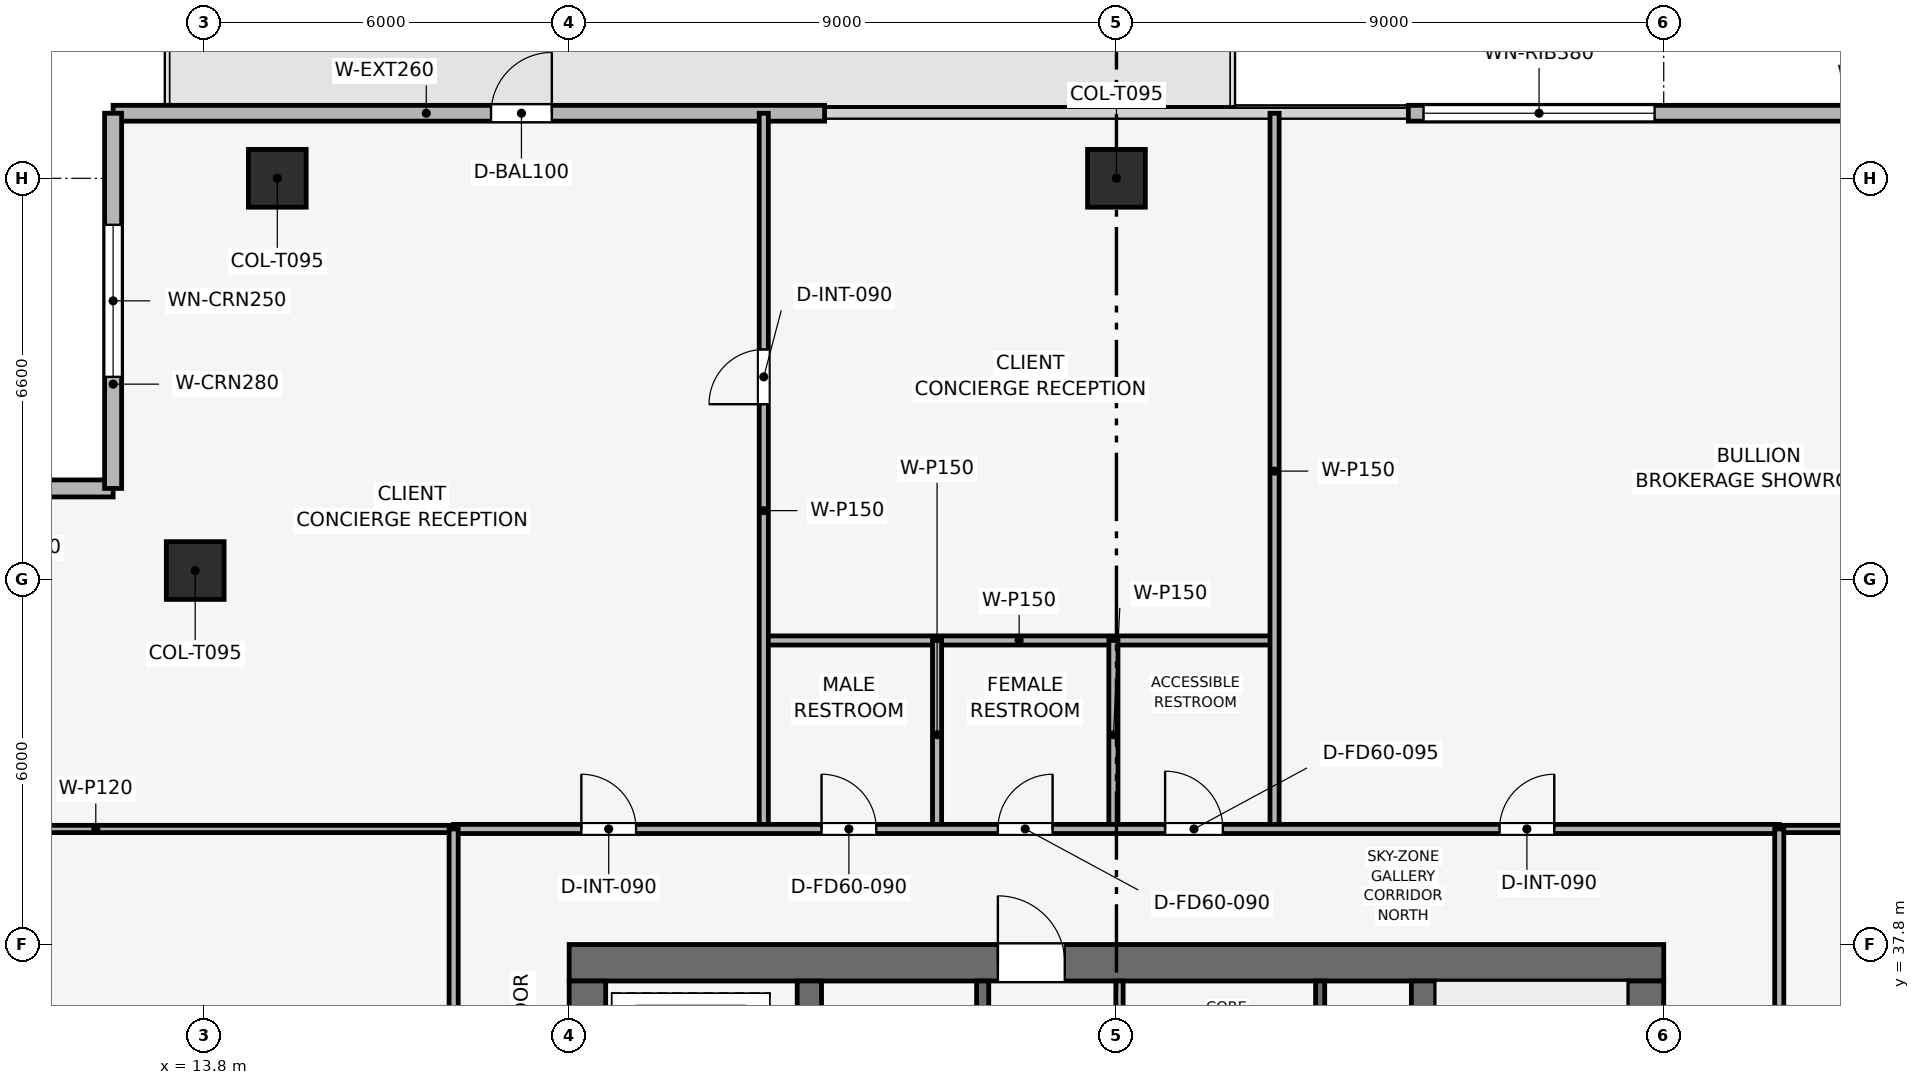
"""IFC4 building model, lengths in metres.
Left out: names, types, materials, properties, quantities, classifications, styles, units other than length and angle.
Written with IfcOpenShell. Run it as: python <this file> out.ifc"""

import sys

from ifc_helpers import new_model, si_unit, direction, frame, frame_2d, origin, origin_2d, place, context, subcontext, project, spatial, rectangle, extrude, element, fill, save


model = new_model("IFC4")
c1 = context("Model", 3, precision=1e-05, world=origin(), true_north=direction((0.0, 1.0)))
c2 = subcontext(c1, "Body", "Model", "MODEL_VIEW")
j1 = project(units=[si_unit("LENGTHUNIT", "METRE"), si_unit("PLANEANGLEUNIT", "RADIAN")], contexts=[c1])
p1 = place(None, origin())
s1 = spatial("IfcSite", under=j1, at=p1, CompositionType="ELEMENT")
p2 = place(p1, origin())
s2 = spatial("IfcBuilding", under=s1, at=p2, CompositionType="ELEMENT")
p3 = place(p2, frame((0.0, 0.0, 318.0)))
s3 = spatial("IfcBuildingStorey", under=s2, at=p3, CompositionType="ELEMENT", Elevation=318.0)
p4 = place(p3, frame((19.8, 37.5, 0.0), z_axis=(0.0, 0.0, 1.0), x_axis=(1.0, 0.0, 0.0)))
e1 = element("IfcWall", 1, at=p4, inside=s3, PredefinedType="SHEAR", context=c2, shape_type="SweptSolid", body=[
    extrude(rectangle(XDim=18.0, YDim=0.6, at=frame_2d((9.0, 0.0))), origin(), (0.0, 0.0, 1.0), 3.75),
])
p5 = place(p4, frame((7.05, 0.0, 0.0)))
e2 = element("IfcOpeningElement", 2, at=p5, cuts=e1, PredefinedType="OPENING", context=c2, shape_type="SweptSolid", body=[
    extrude(rectangle(XDim=1.1, YDim=2.15, at=frame_2d((0.55, 1.075))), frame((0.0, 0.31, 0.0), z_axis=(0.0, -1.0, 0.0), x_axis=(1.0, 0.0, 0.0)), (0.0, 0.0, 1.0), 0.62),
])
p6 = place(p3, frame((20.1, 20.4, 0.0), z_axis=(0.0, 0.0, 1.0), x_axis=(0.0, 1.0, 0.0)))
e3 = element("IfcWall", 3, at=p6, inside=s3, PredefinedType="SHEAR", context=c2, shape_type="SweptSolid", body=[
    extrude(rectangle(XDim=16.8, YDim=0.6, at=frame_2d((8.4, 0.0))), origin(), (0.0, 0.0, 1.0), 3.75),
])
p7 = place(p6, frame((10.4, 0.0, 0.0)))
e4 = element("IfcOpeningElement", 4, at=p7, cuts=e3, PredefinedType="OPENING", context=c2, shape_type="SweptSolid", body=[
    extrude(rectangle(XDim=1.1, YDim=2.15, at=frame_2d((0.55, 1.075))), frame((0.0, 0.31, 0.0), z_axis=(0.0, -1.0, 0.0), x_axis=(1.0, 0.0, 0.0)), (0.0, 0.0, 1.0), 0.62),
])
p8 = place(p3, frame((37.5, 20.4, 0.0), z_axis=(0.0, 0.0, 1.0), x_axis=(0.0, 1.0, 0.0)))
e5 = element("IfcWall", 5, at=p8, inside=s3, PredefinedType="SHEAR", context=c2, shape_type="SweptSolid", body=[
    extrude(rectangle(XDim=16.8, YDim=0.6, at=frame_2d((8.4, 0.0))), origin(), (0.0, 0.0, 1.0), 3.75),
])
p9 = place(p8, frame((4.9, 0.0, 0.0)))
e6 = element("IfcOpeningElement", 6, at=p9, cuts=e5, PredefinedType="OPENING", context=c2, shape_type="SweptSolid", body=[
    extrude(rectangle(XDim=1.1, YDim=2.15, at=frame_2d((0.55, 1.075))), frame((0.0, 0.31, 0.0), z_axis=(0.0, -1.0, 0.0), x_axis=(1.0, 0.0, 0.0)), (0.0, 0.0, 1.0), 0.62),
])
for number, where, z_axis, x_axis in (
    (7, (23.75, 20.4, 0.0), (0.0, 0.0, 1.0), (0.0, 1.0, 0.0)),
    (8, (33.85, 20.4, 0.0), (0.0, 0.0, 1.0), (0.0, 1.0, 0.0)),
):
    element("IfcWall", number, at=place(p3, frame(where, z_axis=z_axis, x_axis=x_axis)), inside=s3, PredefinedType="SHEAR", context=c2, shape_type="SweptSolid", body=[
        extrude(rectangle(XDim=16.8, YDim=0.4, at=frame_2d((8.4, 0.0))), origin(), (0.0, 0.0, 1.0), 3.75),
    ])
for number, where, z_axis, x_axis in (
    (9, (28.8, 50.4, 0.003), (0.0, 0.0, 1.0), (1.0, 0.0, 0.0)),
    (10, (15.0, 50.4, 0.003), (0.0, 0.0, 1.0), (1.0, 0.0, 0.0)),
    (11, (13.65, 43.95, 0.003), (0.0, 0.0, 1.0), (1.0, 0.0, 0.0)),
):
    element("IfcColumn", number, at=place(p3, frame(where, z_axis=z_axis, x_axis=x_axis)), inside=s3, PredefinedType="COLUMN", context=c2, shape_type="SweptSolid", body=[
        extrude(rectangle(XDim=0.95, YDim=0.95, at=origin_2d()), origin(), (0.0, 0.0, 1.0), 3.504),
    ])
p10 = place(p3, frame((12.3, 51.47, 0.0), z_axis=(0.0, 0.0, 1.0), x_axis=(1.0, 0.0, 0.0)))
e12 = element("IfcWall", 12, at=p10, inside=s3, PredefinedType="SOLIDWALL", context=c2, shape_type="SweptSolid", body=[
    extrude(rectangle(XDim=11.7, YDim=0.26, at=frame_2d((5.85, 0.0))), origin(), (0.0, 0.0, 1.0), 3.51),
])
p11 = place(p10, frame((6.215, 0.0, 0.0)))
e13 = element("IfcOpeningElement", 13, at=p11, cuts=e12, PredefinedType="OPENING", context=c2, shape_type="SweptSolid", body=[
    extrude(rectangle(XDim=1.0, YDim=2.2, at=frame_2d((0.5, 1.1))), frame((0.0, 0.14, 0.0), z_axis=(0.0, -1.0, 0.0), x_axis=(1.0, 0.0, 0.0)), (0.0, 0.0, 1.0), 0.28),
])
p12 = place(p3, frame((33.6, 51.47, 0.0), z_axis=(0.0, 0.0, 1.0), x_axis=(1.0, 0.0, 0.0)))
e14 = element("IfcWall", 14, at=p12, inside=s3, PredefinedType="SOLIDWALL", context=c2, shape_type="SweptSolid", body=[
    extrude(rectangle(XDim=11.7, YDim=0.26, at=frame_2d((5.85, 0.0))), origin(), (0.0, 0.0, 1.0), 3.51),
])
p13 = place(p12, frame((0.25, 0.0, 0.9)))
e15 = element("IfcOpeningElement", 15, at=p13, cuts=e14, PredefinedType="OPENING", context=c2, shape_type="SweptSolid", body=[
    extrude(rectangle(XDim=3.8, YDim=1.9, at=frame_2d((1.9, 0.95))), frame((0.0, 0.14, 0.0), z_axis=(0.0, -1.0, 0.0), x_axis=(1.0, 0.0, 0.0)), (0.0, 0.0, 1.0), 0.28),
])
p14 = place(p3, frame((6.13, 45.3, 0.0), z_axis=(0.0, 0.0, 1.0), x_axis=(1.0, 0.0, 0.0)))
e16 = element("IfcWall", 16, at=p14, inside=s3, PredefinedType="SOLIDWALL", context=c2, shape_type="SweptSolid", body=[
    extrude(rectangle(XDim=6.17, YDim=0.28, at=frame_2d((3.085, 0.0))), origin(), (0.0, 0.0, 1.0), 3.51),
])
p15 = place(p14, frame((1.835, 0.0, 0.9)))
e17 = element("IfcOpeningElement", 17, at=p15, cuts=e16, PredefinedType="OPENING", context=c2, shape_type="SweptSolid", body=[
    extrude(rectangle(XDim=2.5, YDim=1.9, at=frame_2d((1.25, 0.95))), frame((0.0, 0.15, 0.0), z_axis=(0.0, -1.0, 0.0), x_axis=(1.0, 0.0, 0.0)), (0.0, 0.0, 1.0), 0.3),
])
p16 = place(p3, frame((12.3, 45.3, 0.0), z_axis=(0.0, 0.0, 1.0), x_axis=(0.0, 1.0, 0.0)))
e18 = element("IfcWall", 18, at=p16, inside=s3, PredefinedType="SOLIDWALL", context=c2, shape_type="SweptSolid", body=[
    extrude(rectangle(XDim=6.17, YDim=0.28, at=frame_2d((3.085, 0.0))), origin(), (0.0, 0.0, 1.0), 3.51),
])
p17 = place(p16, frame((1.835, 0.0, 0.9)))
e19 = element("IfcOpeningElement", 19, at=p17, cuts=e18, PredefinedType="OPENING", context=c2, shape_type="SweptSolid", body=[
    extrude(rectangle(XDim=2.5, YDim=1.9, at=frame_2d((1.25, 0.95))), frame((0.0, 0.15, 0.0), z_axis=(0.0, -1.0, 0.0), x_axis=(1.0, 0.0, 0.0)), (0.0, 0.0, 1.0), 0.3),
])
p18 = place(p3, frame((32.15, 34.0, 0.0), z_axis=(0.0, 0.0, 1.0), x_axis=(0.0, 1.0, 0.0)))
e20 = element("IfcWall", 20, at=p18, inside=s3, PredefinedType="SHEAR", context=c2, shape_type="SweptSolid", body=[
    extrude(rectangle(XDim=3.2, YDim=0.15, at=frame_2d((1.6, 0.0))), origin(), (0.0, 0.0, 1.0), 3.51),
])
p19 = place(p3, frame((26.6, 34.0, 0.0), z_axis=(0.0, 0.0, 1.0), x_axis=(0.0, 1.0, 0.0)))
e21 = element("IfcWall", 21, at=p19, inside=s3, PredefinedType="SHEAR", context=c2, shape_type="SweptSolid", body=[
    extrude(rectangle(XDim=3.2, YDim=0.2, at=frame_2d((1.6, 0.0))), origin(), (0.0, 0.0, 1.0), 3.51),
])
p20 = place(p19, frame((0.75, 0.0, 0.0)))
e22 = element("IfcOpeningElement", 22, at=p20, cuts=e21, PredefinedType="OPENING", context=c2, shape_type="SweptSolid", body=[
    extrude(rectangle(XDim=1.1, YDim=2.15, at=frame_2d((0.55, 1.075))), frame((0.0, 0.11, 0.0), z_axis=(0.0, -1.0, 0.0), x_axis=(1.0, 0.0, 0.0)), (0.0, 0.0, 1.0), 0.22),
])
p21 = place(p3, frame((28.85, 33.925, 0.0), z_axis=(0.0, 0.0, 1.0), x_axis=(0.0, 1.0, 0.0)))
e23 = element("IfcWall", 23, at=p21, inside=s3, PredefinedType="PARTITIONING", context=c2, shape_type="SweptSolid", body=[
    extrude(rectangle(XDim=3.275, YDim=0.12, at=frame_2d((1.637, 0.0))), origin(), (0.0, 0.0, 1.0), 3.51),
])
p22 = place(p21, frame((0.25, 0.0, 0.0)))
e24 = element("IfcOpeningElement", 24, at=p22, cuts=e23, PredefinedType="OPENING", context=c2, shape_type="SweptSolid", body=[
    extrude(rectangle(XDim=0.85, YDim=2.1, at=frame_2d((0.425, 1.05))), frame((0.0, 0.07, 0.0), z_axis=(0.0, -1.0, 0.0), x_axis=(1.0, 0.0, 0.0)), (0.0, 0.0, 1.0), 0.14),
])
p23 = place(p21, frame((1.795, 0.0, 0.0)))
e25 = element("IfcOpeningElement", 25, at=p23, cuts=e23, PredefinedType="OPENING", context=c2, shape_type="SweptSolid", body=[
    extrude(rectangle(XDim=0.85, YDim=2.1, at=frame_2d((0.425, 1.05))), frame((0.0, 0.07, 0.0), z_axis=(0.0, -1.0, 0.0), x_axis=(1.0, 0.0, 0.0)), (0.0, 0.0, 1.0), 0.14),
])
p24 = place(p3, frame((23.0, 42.8, 0.0), z_axis=(0.0, 0.0, 1.0), x_axis=(1.0, 0.0, 0.0)))
e26 = element("IfcWall", 26, at=p24, inside=s3, PredefinedType="PARTITIONING", context=c2, shape_type="SweptSolid", body=[
    extrude(rectangle(XDim=8.4, YDim=0.15, at=frame_2d((4.2, 0.0))), origin(), (0.0, 0.0, 1.0), 3.095),
])
p25 = place(p3, frame((23.0, 39.7, 0.0), z_axis=(0.0, 0.0, 1.0), x_axis=(0.0, 1.0, 0.0)))
e27 = element("IfcWall", 27, at=p25, inside=s3, PredefinedType="PARTITIONING", context=c2, shape_type="SweptSolid", body=[
    extrude(rectangle(XDim=11.77, YDim=0.15, at=frame_2d((5.885, 0.0))), origin(), (0.0, 0.0, 1.0), 3.135),
])
p26 = place(p25, frame((6.985, 0.0, 0.0)))
e28 = element("IfcOpeningElement", 28, at=p26, cuts=e27, PredefinedType="OPENING", context=c2, shape_type="SweptSolid", body=[
    extrude(rectangle(XDim=0.9, YDim=2.1, at=frame_2d((0.45, 1.05))), frame((0.0, 0.085, 0.0), z_axis=(0.0, -1.0, 0.0), x_axis=(1.0, 0.0, 0.0)), (0.0, 0.0, 1.0), 0.17),
])
p27 = place(p3, frame((31.4, 39.7, 0.0), z_axis=(0.0, 0.0, 1.0), x_axis=(0.0, 1.0, 0.0)))
e29 = element("IfcWall", 29, at=p27, inside=s3, PredefinedType="PARTITIONING", context=c2, shape_type="SweptSolid", body=[
    extrude(rectangle(XDim=11.77, YDim=0.15, at=frame_2d((5.885, 0.0))), origin(), (0.0, 0.0, 1.0), 3.135),
])
p28 = place(p3, frame((25.85, 39.7, 0.0), z_axis=(0.0, 0.0, 1.0), x_axis=(0.0, 1.0, 0.0)))
e30 = element("IfcWall", 30, at=p28, inside=s3, PredefinedType="PARTITIONING", context=c2, shape_type="SweptSolid", body=[
    extrude(rectangle(XDim=3.1, YDim=0.15, at=frame_2d((1.55, 0.0))), origin(), (0.0, 0.0, 1.0), 3.135),
])
p29 = place(p3, frame((28.75, 39.7, 0.0), z_axis=(0.0, 0.0, 1.0), x_axis=(0.0, 1.0, 0.0)))
e31 = element("IfcWall", 31, at=p29, inside=s3, PredefinedType="PARTITIONING", context=c2, shape_type="SweptSolid", body=[
    extrude(rectangle(XDim=3.1, YDim=0.15, at=frame_2d((1.55, 0.0))), origin(), (0.0, 0.0, 1.0), 3.095),
])
for number, where, z_axis, x_axis in (
    (32, (6.13, 39.7, 0.0), (0.0, 0.0, 1.0), (1.0, 0.0, 0.0)),
    (33, (39.7, 39.7, 0.0), (0.0, 0.0, 1.0), (1.0, 0.0, 0.0)),
):
    element("IfcWall", number, at=place(p3, frame(where, z_axis=z_axis, x_axis=x_axis)), inside=s3, PredefinedType="PARTITIONING", context=c2, shape_type="SweptSolid", body=[
        extrude(rectangle(XDim=11.77, YDim=0.12, at=frame_2d((5.885, 0.0))), origin(), (0.0, 0.0, 1.0), 3.095),
    ])
p30 = place(p3, frame((17.9, 39.7, 0.0), z_axis=(0.0, 0.0, 1.0), x_axis=(1.0, 0.0, 0.0)))
e34 = element("IfcWall", 34, at=p30, inside=s3, PredefinedType="PARTITIONING", context=c2, shape_type="SweptSolid", body=[
    extrude(rectangle(XDim=21.8, YDim=0.15, at=frame_2d((10.9, 0.0))), origin(), (0.0, 0.0, 1.0), 3.095),
])
p31 = place(p30, frame((2.1, 0.0, 0.0)))
e35 = element("IfcOpeningElement", 35, at=p31, cuts=e34, PredefinedType="OPENING", context=c2, shape_type="SweptSolid", body=[
    extrude(rectangle(XDim=0.9, YDim=2.1, at=frame_2d((0.45, 1.05))), frame((0.0, 0.085, 0.0), z_axis=(0.0, -1.0, 0.0), x_axis=(1.0, 0.0, 0.0)), (0.0, 0.0, 1.0), 0.17),
])
p32 = place(p30, frame((6.05, 0.0, 0.0)))
e36 = element("IfcOpeningElement", 36, at=p32, cuts=e34, PredefinedType="OPENING", context=c2, shape_type="SweptSolid", body=[
    extrude(rectangle(XDim=0.9, YDim=2.1, at=frame_2d((0.45, 1.05))), frame((0.0, 0.085, 0.0), z_axis=(0.0, -1.0, 0.0), x_axis=(1.0, 0.0, 0.0)), (0.0, 0.0, 1.0), 0.17),
])
p33 = place(p30, frame((8.95, 0.0, 0.0)))
e37 = element("IfcOpeningElement", 37, at=p33, cuts=e34, PredefinedType="OPENING", context=c2, shape_type="SweptSolid", body=[
    extrude(rectangle(XDim=0.9, YDim=2.1, at=frame_2d((0.45, 1.05))), frame((0.0, 0.085, 0.0), z_axis=(0.0, -1.0, 0.0), x_axis=(1.0, 0.0, 0.0)), (0.0, 0.0, 1.0), 0.17),
])
p34 = place(p30, frame((11.7, 0.0, 0.0)))
e38 = element("IfcOpeningElement", 38, at=p34, cuts=e34, PredefinedType="OPENING", context=c2, shape_type="SweptSolid", body=[
    extrude(rectangle(XDim=0.95, YDim=2.1, at=frame_2d((0.475, 1.05))), frame((0.0, 0.085, 0.0), z_axis=(0.0, -1.0, 0.0), x_axis=(1.0, 0.0, 0.0)), (0.0, 0.0, 1.0), 0.17),
])
p35 = place(p30, frame((17.2, 0.0, 0.0)))
e39 = element("IfcOpeningElement", 39, at=p35, cuts=e34, PredefinedType="OPENING", context=c2, shape_type="SweptSolid", body=[
    extrude(rectangle(XDim=0.9, YDim=2.1, at=frame_2d((0.45, 1.05))), frame((0.0, 0.085, 0.0), z_axis=(0.0, -1.0, 0.0), x_axis=(1.0, 0.0, 0.0)), (0.0, 0.0, 1.0), 0.17),
])
p36 = place(p3, frame((17.9, 12.3, 0.0), z_axis=(0.0, 0.0, 1.0), x_axis=(0.0, 1.0, 0.0)))
e40 = element("IfcWall", 40, at=p36, inside=s3, PredefinedType="PARTITIONING", context=c2, shape_type="SweptSolid", body=[
    extrude(rectangle(XDim=27.4, YDim=0.15, at=frame_2d((13.7, 0.0))), origin(), (0.0, 0.0, 1.0), 3.095),
])
p37 = place(p36, frame((13.25, 0.0, 0.0)))
e41 = element("IfcOpeningElement", 41, at=p37, cuts=e40, PredefinedType="OPENING", context=c2, shape_type="SweptSolid", body=[
    extrude(rectangle(XDim=0.9, YDim=2.1, at=frame_2d((0.45, 1.05))), frame((0.0, 0.085, 0.0), z_axis=(0.0, -1.0, 0.0), x_axis=(1.0, 0.0, 0.0)), (0.0, 0.0, 1.0), 0.17),
])
p38 = place(p3, frame((39.7, 24.4, 0.0), z_axis=(0.0, 0.0, 1.0), x_axis=(0.0, 1.0, 0.0)))
e42 = element("IfcWall", 42, at=p38, inside=s3, PredefinedType="PARTITIONING", context=c2, shape_type="SweptSolid", body=[
    extrude(rectangle(XDim=15.3, YDim=0.15, at=frame_2d((7.65, 0.0))), origin(), (0.0, 0.0, 1.0), 3.095),
])
p39 = place(p38, frame((0.7, 0.0, 0.0)))
e43 = element("IfcOpeningElement", 43, at=p39, cuts=e42, PredefinedType="OPENING", context=c2, shape_type="SweptSolid", body=[
    extrude(rectangle(XDim=0.9, YDim=2.1, at=frame_2d((0.45, 1.05))), frame((0.0, 0.085, 0.0), z_axis=(0.0, -1.0, 0.0), x_axis=(1.0, 0.0, 0.0)), (0.0, 0.0, 1.0), 0.17),
])
p40 = place(p38, frame((4.148, 0.0, 0.0)))
e44 = element("IfcOpeningElement", 44, at=p40, cuts=e42, PredefinedType="OPENING", context=c2, shape_type="SweptSolid", body=[
    extrude(rectangle(XDim=0.9, YDim=2.1, at=frame_2d((0.45, 1.05))), frame((0.0, 0.085, 0.0), z_axis=(0.0, -1.0, 0.0), x_axis=(1.0, 0.0, 0.0)), (0.0, 0.0, 1.0), 0.17),
])
p41 = place(p38, frame((10.648, 0.0, 0.0)))
e45 = element("IfcOpeningElement", 45, at=p41, cuts=e42, PredefinedType="OPENING", context=c2, shape_type="SweptSolid", body=[
    extrude(rectangle(XDim=0.9, YDim=2.1, at=frame_2d((0.45, 1.05))), frame((0.0, 0.085, 0.0), z_axis=(0.0, -1.0, 0.0), x_axis=(1.0, 0.0, 0.0)), (0.0, 0.0, 1.0), 0.17),
])
p42 = place(p11, origin())
e46 = element("IfcDoor", 46, at=p42, inside=s3, OperationType="SINGLE_SWING_RIGHT", PredefinedType="DOOR", context=c2, shape_type="SweptSolid", body=[
    extrude(rectangle(XDim=1.0, YDim=2.2, at=frame_2d((0.5, 1.1))), frame((0.0, 0.025, 0.0), z_axis=(0.0, -1.0, 0.0), x_axis=(1.0, 0.0, 0.0)), (0.0, 0.0, 1.0), 0.05),
])
fill(e13, e46)
p43 = place(p13, origin())
e47 = element("IfcWindow", 47, at=p43, inside=s3, PartitioningType="SINGLE_PANEL", PredefinedType="WINDOW", context=c2, shape_type="SweptSolid", body=[
    extrude(rectangle(XDim=3.8, YDim=1.9, at=frame_2d((1.9, 0.95))), frame((0.0, 0.03, 0.0), z_axis=(0.0, -1.0, 0.0), x_axis=(1.0, 0.0, 0.0)), (0.0, 0.0, 1.0), 0.06),
])
fill(e15, e47)
p44 = place(p17, origin())
e48 = element("IfcWindow", 48, at=p44, inside=s3, PartitioningType="SINGLE_PANEL", PredefinedType="WINDOW", context=c2, shape_type="SweptSolid", body=[
    extrude(rectangle(XDim=2.5, YDim=1.9, at=frame_2d((1.25, 0.95))), frame((0.0, 0.03, 0.0), z_axis=(0.0, -1.0, 0.0), x_axis=(1.0, 0.0, 0.0)), (0.0, 0.0, 1.0), 0.06),
])
fill(e19, e48)
p45 = place(p26, origin())
e49 = element("IfcDoor", 49, at=p45, inside=s3, OperationType="SINGLE_SWING_LEFT", PredefinedType="DOOR", context=c2, shape_type="SweptSolid", body=[
    extrude(rectangle(XDim=0.9, YDim=2.1, at=frame_2d((0.45, 1.05))), frame((0.0, 0.025, 0.0), z_axis=(0.0, -1.0, 0.0), x_axis=(1.0, 0.0, 0.0)), (0.0, 0.0, 1.0), 0.05),
])
fill(e28, e49)
p46 = place(p31, origin())
e50 = element("IfcDoor", 50, at=p46, inside=s3, OperationType="SINGLE_SWING_LEFT", PredefinedType="DOOR", context=c2, shape_type="SweptSolid", body=[
    extrude(rectangle(XDim=0.9, YDim=2.1, at=frame_2d((0.45, 1.05))), frame((0.0, 0.025, 0.0), z_axis=(0.0, -1.0, 0.0), x_axis=(1.0, 0.0, 0.0)), (0.0, 0.0, 1.0), 0.05),
])
fill(e35, e50)
p47 = place(p32, origin())
e51 = element("IfcDoor", 51, at=p47, inside=s3, OperationType="SINGLE_SWING_LEFT", PredefinedType="DOOR", context=c2, shape_type="SweptSolid", body=[
    extrude(rectangle(XDim=0.9, YDim=2.1, at=frame_2d((0.45, 1.05))), frame((0.0, 0.025, 0.0), z_axis=(0.0, -1.0, 0.0), x_axis=(1.0, 0.0, 0.0)), (0.0, 0.0, 1.0), 0.05),
])
fill(e36, e51)
p48 = place(p33, origin())
e52 = element("IfcDoor", 52, at=p48, inside=s3, OperationType="SINGLE_SWING_RIGHT", PredefinedType="DOOR", context=c2, shape_type="SweptSolid", body=[
    extrude(rectangle(XDim=0.9, YDim=2.1, at=frame_2d((0.45, 1.05))), frame((0.0, 0.025, 0.0), z_axis=(0.0, -1.0, 0.0), x_axis=(1.0, 0.0, 0.0)), (0.0, 0.0, 1.0), 0.05),
])
fill(e37, e52)
p49 = place(p34, origin())
e53 = element("IfcDoor", 53, at=p49, inside=s3, OperationType="SINGLE_SWING_LEFT", PredefinedType="DOOR", context=c2, shape_type="SweptSolid", body=[
    extrude(rectangle(XDim=0.95, YDim=2.1, at=frame_2d((0.475, 1.05))), frame((0.0, 0.025, 0.0), z_axis=(0.0, -1.0, 0.0), x_axis=(1.0, 0.0, 0.0)), (0.0, 0.0, 1.0), 0.05),
])
fill(e38, e53)
p50 = place(p35, origin())
e54 = element("IfcDoor", 54, at=p50, inside=s3, OperationType="SINGLE_SWING_RIGHT", PredefinedType="DOOR", context=c2, shape_type="SweptSolid", body=[
    extrude(rectangle(XDim=0.9, YDim=2.1, at=frame_2d((0.45, 1.05))), frame((0.0, 0.025, 0.0), z_axis=(0.0, -1.0, 0.0), x_axis=(1.0, 0.0, 0.0)), (0.0, 0.0, 1.0), 0.05),
])
fill(e39, e54)
p51 = place(p5, origin())
e55 = element("IfcDoor", 55, at=p51, inside=s3, OperationType="SINGLE_SWING_LEFT", PredefinedType="DOOR", context=c2, shape_type="SweptSolid", body=[
    extrude(rectangle(XDim=1.1, YDim=2.15, at=frame_2d((0.55, 1.075))), frame((0.0, 0.025, 0.0), z_axis=(0.0, -1.0, 0.0), x_axis=(1.0, 0.0, 0.0)), (0.0, 0.0, 1.0), 0.05),
])
fill(e2, e55)
save(model, sys.argv[1])
